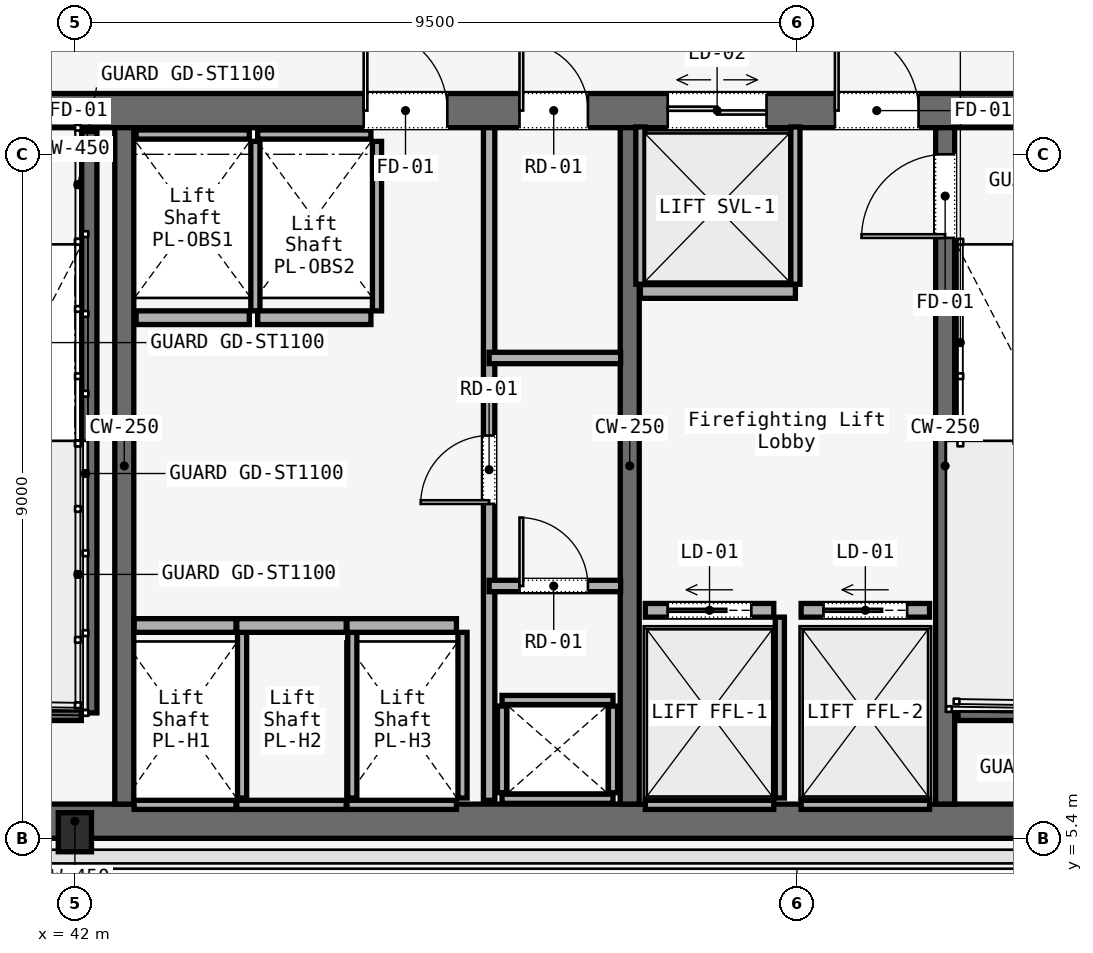
"""IFC4 building model, lengths in metres.
Left out: names, types, materials, properties, quantities, classifications, styles, units other than length and angle.
Written with IfcOpenShell. Run it as: python <this file> out.ifc"""

import sys

from ifc_helpers import new_model, si_unit, direction, frame, frame_2d, origin, origin_2d, place, context, subcontext, project, spatial, rectangle, i_section, extrude, element, fill, save


model = new_model("IFC4")
c1 = context("Model", 3, precision=1e-05, world=origin(), true_north=direction((0.0, 1.0)))
c2 = subcontext(c1, "Body", "Model", "MODEL_VIEW")
j1 = project(units=[si_unit("LENGTHUNIT", "METRE"), si_unit("PLANEANGLEUNIT", "RADIAN")], contexts=[c1])
p1 = place(None, origin())
s1 = spatial("IfcSite", under=j1, at=p1, CompositionType="ELEMENT")
p2 = place(p1, origin())
s2 = spatial("IfcBuilding", under=s1, at=p2, CompositionType="ELEMENT")
p3 = place(p2, frame((0.0, 0.0, 100.6)))
s3 = spatial("IfcBuildingStorey", under=s2, at=p3, CompositionType="ELEMENT", Elevation=100.6)
p4 = place(p3, frame((26.45, 14.975, 0.0), z_axis=(0.0, 0.0, 1.0), x_axis=(1.0, 0.0, 0.0)))
e1 = element("IfcWall", 1, at=p4, inside=s3, PredefinedType="SOLIDWALL", context=c2, shape_type="SweptSolid", body=[
    extrude(rectangle(XDim=31.1, YDim=0.45, at=frame_2d((15.55, 0.0))), origin(), (0.0, 0.0, 1.0), 3.58),
])
p5 = place(p4, frame((1.65, 0.0, 0.0)))
e2 = element("IfcOpeningElement", 2, at=p5, cuts=e1, PredefinedType="OPENING", context=c2, shape_type="SweptSolid", body=[
    extrude(rectangle(XDim=1.1, YDim=2.2, at=frame_2d((0.55, 1.1))), frame((0.0, 0.225, 0.0), z_axis=(0.0, -1.0, 0.0), x_axis=(1.0, 0.0, 0.0)), (0.0, 0.0, 1.0), 0.45),
])
p6 = place(p4, frame((13.65, 0.0, 0.0)))
e3 = element("IfcOpeningElement", 3, at=p6, cuts=e1, PredefinedType="OPENING", context=c2, shape_type="SweptSolid", body=[
    extrude(rectangle(XDim=1.1, YDim=2.2, at=frame_2d((0.55, 1.1))), frame((0.0, 0.225, 0.0), z_axis=(0.0, -1.0, 0.0), x_axis=(1.0, 0.0, 0.0)), (0.0, 0.0, 1.0), 0.45),
])
p7 = place(p4, frame((25.55, 0.0, 0.0)))
e4 = element("IfcOpeningElement", 4, at=p7, cuts=e1, PredefinedType="OPENING", context=c2, shape_type="SweptSolid", body=[
    extrude(rectangle(XDim=1.1, YDim=2.2, at=frame_2d((0.55, 1.1))), frame((0.0, 0.225, 0.0), z_axis=(0.0, -1.0, 0.0), x_axis=(1.0, 0.0, 0.0)), (0.0, 0.0, 1.0), 0.45),
])
p8 = place(p4, frame((10.7, 0.0, 0.0)))
e5 = element("IfcOpeningElement", 5, at=p8, cuts=e1, PredefinedType="OPENING", context=c2, shape_type="SweptSolid", body=[
    extrude(rectangle(XDim=1.4, YDim=2.2, at=frame_2d((0.7, 1.1))), frame((0.0, 0.225, 0.0), z_axis=(0.0, -1.0, 0.0), x_axis=(1.0, 0.0, 0.0)), (0.0, 0.0, 1.0), 0.45),
])
p9 = place(p4, frame((19.35, 0.0, 0.0)))
e6 = element("IfcOpeningElement", 6, at=p9, cuts=e1, PredefinedType="OPENING", context=c2, shape_type="SweptSolid", body=[
    extrude(rectangle(XDim=1.1, YDim=2.2, at=frame_2d((0.55, 1.1))), frame((0.0, 0.225, 0.0), z_axis=(0.0, -1.0, 0.0), x_axis=(1.0, 0.0, 0.0)), (0.0, 0.0, 1.0), 0.45),
])
p10 = place(p4, frame((21.4, 0.0, 0.0)))
e7 = element("IfcOpeningElement", 7, at=p10, cuts=e1, PredefinedType="OPENING", context=c2, shape_type="SweptSolid", body=[
    extrude(rectangle(XDim=0.9, YDim=2.1, at=frame_2d((0.45, 1.05))), frame((0.0, 0.225, 0.0), z_axis=(0.0, -1.0, 0.0), x_axis=(1.0, 0.0, 0.0)), (0.0, 0.0, 1.0), 0.45),
])
p11 = place(p4, frame((23.35, 0.0, 0.0)))
e8 = element("IfcOpeningElement", 8, at=p11, cuts=e1, PredefinedType="OPENING", context=c2, shape_type="SweptSolid", body=[
    extrude(rectangle(XDim=1.3, YDim=2.3, at=frame_2d((0.65, 1.15))), frame((0.0, 0.225, 0.0), z_axis=(0.0, -1.0, 0.0), x_axis=(1.0, 0.0, 0.0)), (0.0, 0.0, 1.0), 0.45),
])
p12 = place(p3, frame((26.45, 5.625, 0.0), z_axis=(0.0, 0.0, 1.0), x_axis=(1.0, 0.0, 0.0)))
e9 = element("IfcWall", 9, at=p12, inside=s3, PredefinedType="SOLIDWALL", context=c2, shape_type="SweptSolid", body=[
    extrude(rectangle(XDim=31.1, YDim=0.45, at=frame_2d((15.55, 0.0))), origin(), (0.0, 0.0, 1.0), 3.58),
])
for number, where, z_axis, x_axis in (
    (10, (42.65, 5.85, 0.0), (0.0, 0.0, 1.0), (0.0, 1.0, 0.0)),
    (11, (49.3, 5.85, 0.0), (0.0, 0.0, 1.0), (0.0, 1.0, 0.0)),
):
    element("IfcWall", number, at=place(p3, frame(where, z_axis=z_axis, x_axis=x_axis)), inside=s3, PredefinedType="SOLIDWALL", context=c2, shape_type="SweptSolid", body=[
        extrude(rectangle(XDim=8.9, YDim=0.25, at=frame_2d((4.45, 0.0))), origin(), (0.0, 0.0, 1.0), 3.58),
    ])
p13 = place(p3, frame((53.45, 5.85, 0.0), z_axis=(0.0, 0.0, 1.0), x_axis=(0.0, 1.0, 0.0)))
e12 = element("IfcWall", 12, at=p13, inside=s3, PredefinedType="SOLIDWALL", context=c2, shape_type="SweptSolid", body=[
    extrude(rectangle(XDim=8.9, YDim=0.25, at=frame_2d((4.45, 0.0))), origin(), (0.0, 0.0, 1.0), 3.58),
])
p14 = place(p13, frame((7.45, 0.0, 0.0)))
e13 = element("IfcOpeningElement", 13, at=p14, cuts=e12, PredefinedType="OPENING", context=c2, shape_type="SweptSolid", body=[
    extrude(rectangle(XDim=1.1, YDim=2.2, at=frame_2d((0.55, 1.1))), frame((0.0, 0.125, 0.0), z_axis=(0.0, -1.0, 0.0), x_axis=(1.0, 0.0, 0.0)), (0.0, 0.0, 1.0), 0.25),
])
p15 = place(p3, frame((42.0, 5.48, 0.0), z_axis=(0.0, 0.0, 1.0), x_axis=(1.0, 0.0, 0.0)))
e14 = element("IfcColumn", 14, at=p15, inside=s3, PredefinedType="COLUMN", context=c2, shape_type="SweptSolid", body=[
    extrude(i_section(OverallWidth=0.437, OverallDepth=0.514, WebThickness=0.061, FlangeThickness=0.077, FilletRadius=0.015, at=origin_2d()), origin(), (0.0, 0.0, 1.0), 3.58),
])
p16 = place(p3, frame((42.19, 14.7, 0.0), z_axis=(0.0, 0.0, 1.0), x_axis=(0.0, -1.0, 0.0)))
e15 = element("IfcWall", 15, at=p16, inside=s3, PredefinedType="SOLIDWALL", context=c2, shape_type="SweptSolid", body=[
    extrude(rectangle(XDim=7.65, YDim=0.2, at=frame_2d((3.825, 0.0))), origin(), (0.0, 0.0, 1.0), 3.8),
])
for number, where, z_axis, x_axis in (
    (16, (38.97, 7.05, 0.0), (0.0, 0.0, 1.0), (1.0, 0.0, 0.0)),
    (17, (53.62, 7.05, 0.0), (0.0, 0.0, 1.0), (1.0, 0.0, 0.0)),
):
    element("IfcWall", number, at=place(p3, frame(where, z_axis=z_axis, x_axis=x_axis)), inside=s3, PredefinedType="SOLIDWALL", context=c2, shape_type="SweptSolid", body=[
        extrude(rectangle(XDim=3.115, YDim=0.2, at=frame_2d((1.558, 0.0))), origin(), (0.0, 0.0, 1.0), 3.8),
    ])
for number, where, z_axis, x_axis in (
    (18, (47.62, 5.92, 0.0), (0.0, 0.0, 1.0), (1.0, 0.0, 0.0)),
    (19, (47.62, 7.22, 0.0), (0.0, 0.0, 1.0), (1.0, 0.0, 0.0)),
):
    element("IfcWall", number, at=place(p3, frame(where, z_axis=z_axis, x_axis=x_axis)), inside=s3, PredefinedType="SOLIDWALL", context=c2, shape_type="SweptSolid", body=[
        extrude(rectangle(XDim=1.46, YDim=0.12, at=frame_2d((0.73, 0.0))), origin(), (0.0, 0.0, 1.0), 2.95),
    ])
for number, where, z_axis, x_axis in (
    (20, (47.62, 6.0, 0.0), (0.0, 0.0, 1.0), (0.0, 1.0, 0.0)),
    (21, (49.08, 6.0, 0.0), (0.0, 0.0, 1.0), (0.0, 1.0, 0.0)),
):
    element("IfcWall", number, at=place(p3, frame(where, z_axis=z_axis, x_axis=x_axis)), inside=s3, PredefinedType="SOLIDWALL", context=c2, shape_type="SweptSolid", body=[
        extrude(rectangle(XDim=1.14, YDim=0.12, at=frame_2d((0.57, 0.0))), origin(), (0.0, 0.0, 1.0), 2.95),
    ])
p17 = place(p3, frame((47.45, 5.9, 0.0), z_axis=(0.0, 0.0, 1.0), x_axis=(0.0, 1.0, 0.0)))
e22 = element("IfcWall", 22, at=p17, inside=s3, PredefinedType="PARTITIONING", context=c2, shape_type="SweptSolid", body=[
    extrude(rectangle(XDim=8.85, YDim=0.15, at=frame_2d((4.425, 0.0))), origin(), (0.0, 0.0, 1.0), 2.95),
])
p18 = place(p17, frame((3.9, 0.0, 0.0)))
e23 = element("IfcOpeningElement", 23, at=p18, cuts=e22, PredefinedType="OPENING", context=c2, shape_type="SweptSolid", body=[
    extrude(rectangle(XDim=0.9, YDim=2.1, at=frame_2d((0.45, 1.05))), frame((0.0, 0.075, 0.0), z_axis=(0.0, -1.0, 0.0), x_axis=(1.0, 0.0, 0.0)), (0.0, 0.0, 1.0), 0.15),
])
p19 = place(p3, frame((47.45, 8.72, 0.0), z_axis=(0.0, 0.0, 1.0), x_axis=(1.0, 0.0, 0.0)))
e24 = element("IfcWall", 24, at=p19, inside=s3, PredefinedType="PARTITIONING", context=c2, shape_type="SweptSolid", body=[
    extrude(rectangle(XDim=1.73, YDim=0.15, at=frame_2d((0.865, 0.0))), origin(), (0.0, 0.0, 1.0), 2.95),
])
p20 = place(p19, frame((0.4, 0.0, 0.0)))
e25 = element("IfcOpeningElement", 25, at=p20, cuts=e24, PredefinedType="OPENING", context=c2, shape_type="SweptSolid", body=[
    extrude(rectangle(XDim=0.9, YDim=2.1, at=frame_2d((0.45, 1.05))), frame((0.0, 0.075, 0.0), z_axis=(0.0, -1.0, 0.0), x_axis=(1.0, 0.0, 0.0)), (0.0, 0.0, 1.0), 0.15),
])
p21 = place(p3, frame((47.45, 11.72, 0.0), z_axis=(0.0, 0.0, 1.0), x_axis=(1.0, 0.0, 0.0)))
e26 = element("IfcWall", 26, at=p21, inside=s3, PredefinedType="PARTITIONING", context=c2, shape_type="SweptSolid", body=[
    extrude(rectangle(XDim=1.73, YDim=0.15, at=frame_2d((0.865, 0.0))), origin(), (0.0, 0.0, 1.0), 2.95),
])
p22 = place(p3, frame((42.78, 8.2, 0.0), z_axis=(0.0, 0.0, 1.0), x_axis=(1.0, 0.0, 0.0)))
e27 = element("IfcWall", 27, at=p22, inside=s3, PredefinedType="SOLIDWALL", context=c2, shape_type="SweptSolid", body=[
    extrude(rectangle(XDim=1.34, YDim=0.18, at=frame_2d((0.67, 0.0))), origin(), (0.0, 0.0, 1.0), 2.95),
])
p23 = place(p3, frame((42.78, 5.84, 0.0), z_axis=(0.0, 0.0, 1.0), x_axis=(1.0, 0.0, 0.0)))
e28 = element("IfcWall", 28, at=p23, inside=s3, PredefinedType="SOLIDWALL", context=c2, shape_type="SweptSolid", body=[
    extrude(rectangle(XDim=1.34, YDim=0.12, at=frame_2d((0.67, 0.0))), origin(), (0.0, 0.0, 1.0), 2.95),
])
p24 = place(p3, frame((44.2, 5.93, 0.0), z_axis=(0.0, 0.0, 1.0), x_axis=(0.0, 1.0, 0.0)))
e29 = element("IfcWall", 29, at=p24, inside=s3, PredefinedType="SOLIDWALL", context=c2, shape_type="SweptSolid", body=[
    extrude(rectangle(XDim=2.18, YDim=0.12, at=frame_2d((1.09, 0.0))), origin(), (0.0, 0.0, 1.0), 2.95),
])
p25 = place(p3, frame((44.13, 8.2, 0.0), z_axis=(0.0, 0.0, 1.0), x_axis=(1.0, 0.0, 0.0)))
e30 = element("IfcWall", 30, at=p25, inside=s3, PredefinedType="SOLIDWALL", context=c2, shape_type="SweptSolid", body=[
    extrude(rectangle(XDim=1.44, YDim=0.18, at=frame_2d((0.72, 0.0))), origin(), (0.0, 0.0, 1.0), 2.95),
])
p26 = place(p3, frame((44.13, 5.84, 0.0), z_axis=(0.0, 0.0, 1.0), x_axis=(1.0, 0.0, 0.0)))
e31 = element("IfcWall", 31, at=p26, inside=s3, PredefinedType="SOLIDWALL", context=c2, shape_type="SweptSolid", body=[
    extrude(rectangle(XDim=1.44, YDim=0.12, at=frame_2d((0.72, 0.0))), origin(), (0.0, 0.0, 1.0), 2.95),
])
p27 = place(p3, frame((45.65, 5.93, 0.0), z_axis=(0.0, 0.0, 1.0), x_axis=(0.0, 1.0, 0.0)))
e32 = element("IfcWall", 32, at=p27, inside=s3, PredefinedType="SOLIDWALL", context=c2, shape_type="SweptSolid", body=[
    extrude(rectangle(XDim=2.18, YDim=0.12, at=frame_2d((1.09, 0.0))), origin(), (0.0, 0.0, 1.0), 2.95),
])
p28 = place(p3, frame((45.58, 8.2, 0.0), z_axis=(0.0, 0.0, 1.0), x_axis=(1.0, 0.0, 0.0)))
e33 = element("IfcWall", 33, at=p28, inside=s3, PredefinedType="SOLIDWALL", context=c2, shape_type="SweptSolid", body=[
    extrude(rectangle(XDim=1.44, YDim=0.18, at=frame_2d((0.72, 0.0))), origin(), (0.0, 0.0, 1.0), 2.95),
])
p29 = place(p3, frame((45.58, 5.84, 0.0), z_axis=(0.0, 0.0, 1.0), x_axis=(1.0, 0.0, 0.0)))
e34 = element("IfcWall", 34, at=p29, inside=s3, PredefinedType="SOLIDWALL", context=c2, shape_type="SweptSolid", body=[
    extrude(rectangle(XDim=1.44, YDim=0.12, at=frame_2d((0.72, 0.0))), origin(), (0.0, 0.0, 1.0), 2.95),
])
p30 = place(p3, frame((47.1, 5.93, 0.0), z_axis=(0.0, 0.0, 1.0), x_axis=(0.0, 1.0, 0.0)))
e35 = element("IfcWall", 35, at=p30, inside=s3, PredefinedType="SOLIDWALL", context=c2, shape_type="SweptSolid", body=[
    extrude(rectangle(XDim=2.18, YDim=0.12, at=frame_2d((1.09, 0.0))), origin(), (0.0, 0.0, 1.0), 2.95),
])
p31 = place(p3, frame((42.805, 12.25, 0.0), z_axis=(0.0, 0.0, 1.0), x_axis=(1.0, 0.0, 0.0)))
e36 = element("IfcWall", 36, at=p31, inside=s3, PredefinedType="SOLIDWALL", context=c2, shape_type="SweptSolid", body=[
    extrude(rectangle(XDim=1.49, YDim=0.18, at=frame_2d((0.745, 0.0))), origin(), (0.0, 0.0, 1.0), 2.95),
])
p32 = place(p3, frame((42.805, 14.66, 0.0), z_axis=(0.0, 0.0, 1.0), x_axis=(1.0, 0.0, 0.0)))
e37 = element("IfcWall", 37, at=p32, inside=s3, PredefinedType="SOLIDWALL", context=c2, shape_type="SweptSolid", body=[
    extrude(rectangle(XDim=1.49, YDim=0.12, at=frame_2d((0.745, 0.0))), origin(), (0.0, 0.0, 1.0), 2.95),
])
p33 = place(p3, frame((44.375, 12.34, 0.0), z_axis=(0.0, 0.0, 1.0), x_axis=(0.0, 1.0, 0.0)))
e38 = element("IfcWall", 38, at=p33, inside=s3, PredefinedType="SOLIDWALL", context=c2, shape_type="SweptSolid", body=[
    extrude(rectangle(XDim=2.23, YDim=0.12, at=frame_2d((1.115, 0.0))), origin(), (0.0, 0.0, 1.0), 2.95),
])
p34 = place(p3, frame((44.405, 12.25, 0.0), z_axis=(0.0, 0.0, 1.0), x_axis=(1.0, 0.0, 0.0)))
e39 = element("IfcWall", 39, at=p34, inside=s3, PredefinedType="SOLIDWALL", context=c2, shape_type="SweptSolid", body=[
    extrude(rectangle(XDim=1.49, YDim=0.18, at=frame_2d((0.745, 0.0))), origin(), (0.0, 0.0, 1.0), 2.95),
])
p35 = place(p3, frame((44.405, 14.66, 0.0), z_axis=(0.0, 0.0, 1.0), x_axis=(1.0, 0.0, 0.0)))
e40 = element("IfcWall", 40, at=p35, inside=s3, PredefinedType="SOLIDWALL", context=c2, shape_type="SweptSolid", body=[
    extrude(rectangle(XDim=1.49, YDim=0.12, at=frame_2d((0.745, 0.0))), origin(), (0.0, 0.0, 1.0), 2.95),
])
p36 = place(p3, frame((45.975, 12.34, 0.0), z_axis=(0.0, 0.0, 1.0), x_axis=(0.0, 1.0, 0.0)))
e41 = element("IfcWall", 41, at=p36, inside=s3, PredefinedType="SOLIDWALL", context=c2, shape_type="SweptSolid", body=[
    extrude(rectangle(XDim=2.23, YDim=0.12, at=frame_2d((1.115, 0.0))), origin(), (0.0, 0.0, 1.0), 2.95),
])
p37 = place(p3, frame((49.505, 8.4, 0.0), z_axis=(0.0, 0.0, 1.0), x_axis=(1.0, 0.0, 0.0)))
e42 = element("IfcWall", 42, at=p37, inside=s3, PredefinedType="SOLIDWALL", context=c2, shape_type="SweptSolid", body=[
    extrude(rectangle(XDim=1.69, YDim=0.18, at=frame_2d((0.845, 0.0))), origin(), (0.0, 0.0, 1.0), 2.95),
])
p38 = place(p37, frame((0.295, 0.0, 0.0)))
e43 = element("IfcOpeningElement", 43, at=p38, cuts=e42, PredefinedType="OPENING", context=c2, shape_type="SweptSolid", body=[
    extrude(rectangle(XDim=1.1, YDim=2.2, at=frame_2d((0.55, 1.1))), frame((0.0, 0.09, 0.0), z_axis=(0.0, -1.0, 0.0), x_axis=(1.0, 0.0, 0.0)), (0.0, 0.0, 1.0), 0.18),
])
p39 = place(p3, frame((49.505, 5.84, 0.0), z_axis=(0.0, 0.0, 1.0), x_axis=(1.0, 0.0, 0.0)))
e44 = element("IfcWall", 44, at=p39, inside=s3, PredefinedType="SOLIDWALL", context=c2, shape_type="SweptSolid", body=[
    extrude(rectangle(XDim=1.69, YDim=0.12, at=frame_2d((0.845, 0.0))), origin(), (0.0, 0.0, 1.0), 2.95),
])
p40 = place(p3, frame((51.275, 5.93, 0.0), z_axis=(0.0, 0.0, 1.0), x_axis=(0.0, 1.0, 0.0)))
e45 = element("IfcWall", 45, at=p40, inside=s3, PredefinedType="SOLIDWALL", context=c2, shape_type="SweptSolid", body=[
    extrude(rectangle(XDim=2.38, YDim=0.12, at=frame_2d((1.19, 0.0))), origin(), (0.0, 0.0, 1.0), 2.95),
])
p41 = place(p3, frame((51.555, 8.4, 0.0), z_axis=(0.0, 0.0, 1.0), x_axis=(1.0, 0.0, 0.0)))
e46 = element("IfcWall", 46, at=p41, inside=s3, PredefinedType="SOLIDWALL", context=c2, shape_type="SweptSolid", body=[
    extrude(rectangle(XDim=1.69, YDim=0.18, at=frame_2d((0.845, 0.0))), origin(), (0.0, 0.0, 1.0), 2.95),
])
p42 = place(p41, frame((0.295, 0.0, 0.0)))
e47 = element("IfcOpeningElement", 47, at=p42, cuts=e46, PredefinedType="OPENING", context=c2, shape_type="SweptSolid", body=[
    extrude(rectangle(XDim=1.1, YDim=2.2, at=frame_2d((0.55, 1.1))), frame((0.0, 0.09, 0.0), z_axis=(0.0, -1.0, 0.0), x_axis=(1.0, 0.0, 0.0)), (0.0, 0.0, 1.0), 0.18),
])
p43 = place(p3, frame((51.555, 5.84, 0.0), z_axis=(0.0, 0.0, 1.0), x_axis=(1.0, 0.0, 0.0)))
e48 = element("IfcWall", 48, at=p43, inside=s3, PredefinedType="SOLIDWALL", context=c2, shape_type="SweptSolid", body=[
    extrude(rectangle(XDim=1.69, YDim=0.12, at=frame_2d((0.845, 0.0))), origin(), (0.0, 0.0, 1.0), 2.95),
])
p44 = place(p3, frame((49.44, 12.595, 0.0), z_axis=(0.0, 0.0, 1.0), x_axis=(1.0, 0.0, 0.0)))
e49 = element("IfcWall", 49, at=p44, inside=s3, PredefinedType="SOLIDWALL", context=c2, shape_type="SweptSolid", body=[
    extrude(rectangle(XDim=2.04, YDim=0.18, at=frame_2d((1.02, 0.0))), origin(), (0.0, 0.0, 1.0), 2.95),
])
for number, where, z_axis, x_axis in (
    (50, (49.44, 12.69, 0.0), (0.0, 0.0, 1.0), (0.0, 1.0, 0.0)),
    (51, (51.48, 12.69, 0.0), (0.0, 0.0, 1.0), (0.0, 1.0, 0.0)),
):
    element("IfcWall", number, at=place(p3, frame(where, z_axis=z_axis, x_axis=x_axis)), inside=s3, PredefinedType="SOLIDWALL", context=c2, shape_type="SweptSolid", body=[
        extrude(rectangle(XDim=2.07, YDim=0.12, at=frame_2d((1.035, 0.0))), origin(), (0.0, 0.0, 1.0), 2.95),
    ])
p45 = place(p7, origin())
e52 = element("IfcDoor", 52, at=p45, inside=s3, OperationType="SINGLE_SWING_RIGHT", PredefinedType="DOOR", context=c2, shape_type="SweptSolid", body=[
    extrude(rectangle(XDim=1.1, YDim=2.2, at=frame_2d((0.55, 1.1))), frame((0.0, 0.025, 0.0), z_axis=(0.0, -1.0, 0.0), x_axis=(1.0, 0.0, 0.0)), (0.0, 0.0, 1.0), 0.05),
])
fill(e4, e52)
p46 = place(p9, origin())
e53 = element("IfcDoor", 53, at=p46, inside=s3, OperationType="SINGLE_SWING_LEFT", PredefinedType="DOOR", context=c2, shape_type="SweptSolid", body=[
    extrude(rectangle(XDim=1.1, YDim=2.2, at=frame_2d((0.55, 1.1))), frame((0.0, 0.025, 0.0), z_axis=(0.0, -1.0, 0.0), x_axis=(1.0, 0.0, 0.0)), (0.0, 0.0, 1.0), 0.05),
])
fill(e6, e53)
p47 = place(p10, origin())
e54 = element("IfcDoor", 54, at=p47, inside=s3, OperationType="SINGLE_SWING_LEFT", PredefinedType="DOOR", context=c2, shape_type="SweptSolid", body=[
    extrude(rectangle(XDim=0.9, YDim=2.1, at=frame_2d((0.45, 1.05))), frame((0.0, 0.025, 0.0), z_axis=(0.0, -1.0, 0.0), x_axis=(1.0, 0.0, 0.0)), (0.0, 0.0, 1.0), 0.05),
])
fill(e7, e54)
p48 = place(p14, origin())
e55 = element("IfcDoor", 55, at=p48, inside=s3, OperationType="SINGLE_SWING_LEFT", PredefinedType="DOOR", context=c2, shape_type="SweptSolid", body=[
    extrude(rectangle(XDim=1.1, YDim=2.2, at=frame_2d((0.55, 1.1))), frame((0.0, 0.025, 0.0), z_axis=(0.0, -1.0, 0.0), x_axis=(1.0, 0.0, 0.0)), (0.0, 0.0, 1.0), 0.05),
])
fill(e13, e55)
p49 = place(p18, origin())
e56 = element("IfcDoor", 56, at=p49, inside=s3, OperationType="SINGLE_SWING_LEFT", PredefinedType="DOOR", context=c2, shape_type="SweptSolid", body=[
    extrude(rectangle(XDim=0.9, YDim=2.1, at=frame_2d((0.45, 1.05))), frame((0.0, 0.025, 0.0), z_axis=(0.0, -1.0, 0.0), x_axis=(1.0, 0.0, 0.0)), (0.0, 0.0, 1.0), 0.05),
])
fill(e23, e56)
p50 = place(p20, origin())
e57 = element("IfcDoor", 57, at=p50, inside=s3, OperationType="SINGLE_SWING_RIGHT", PredefinedType="DOOR", context=c2, shape_type="SweptSolid", body=[
    extrude(rectangle(XDim=0.9, YDim=2.1, at=frame_2d((0.45, 1.05))), frame((0.0, 0.025, 0.0), z_axis=(0.0, -1.0, 0.0), x_axis=(1.0, 0.0, 0.0)), (0.0, 0.0, 1.0), 0.05),
])
fill(e25, e57)
p51 = place(p38, origin())
e58 = element("IfcDoor", 58, at=p51, inside=s3, OperationType="SLIDING_TO_LEFT", PredefinedType="DOOR", context=c2, shape_type="SweptSolid", body=[
    extrude(rectangle(XDim=1.1, YDim=2.2, at=frame_2d((0.55, 1.1))), frame((0.0, 0.025, 0.0), z_axis=(0.0, -1.0, 0.0), x_axis=(1.0, 0.0, 0.0)), (0.0, 0.0, 1.0), 0.05),
])
fill(e43, e58)
p52 = place(p42, origin())
e59 = element("IfcDoor", 59, at=p52, inside=s3, OperationType="SLIDING_TO_LEFT", PredefinedType="DOOR", context=c2, shape_type="SweptSolid", body=[
    extrude(rectangle(XDim=1.1, YDim=2.2, at=frame_2d((0.55, 1.1))), frame((0.0, 0.025, 0.0), z_axis=(0.0, -1.0, 0.0), x_axis=(1.0, 0.0, 0.0)), (0.0, 0.0, 1.0), 0.05),
])
fill(e47, e59)
p53 = place(p11, origin())
e60 = element("IfcDoor", 60, at=p53, inside=s3, OperationType="DOUBLE_DOOR_SLIDING", PredefinedType="DOOR", context=c2, shape_type="SweptSolid", body=[
    extrude(rectangle(XDim=1.3, YDim=2.3, at=frame_2d((0.65, 1.15))), frame((0.0, 0.025, 0.0), z_axis=(0.0, -1.0, 0.0), x_axis=(1.0, 0.0, 0.0)), (0.0, 0.0, 1.0), 0.05),
])
fill(e8, e60)
save(model, sys.argv[1])
